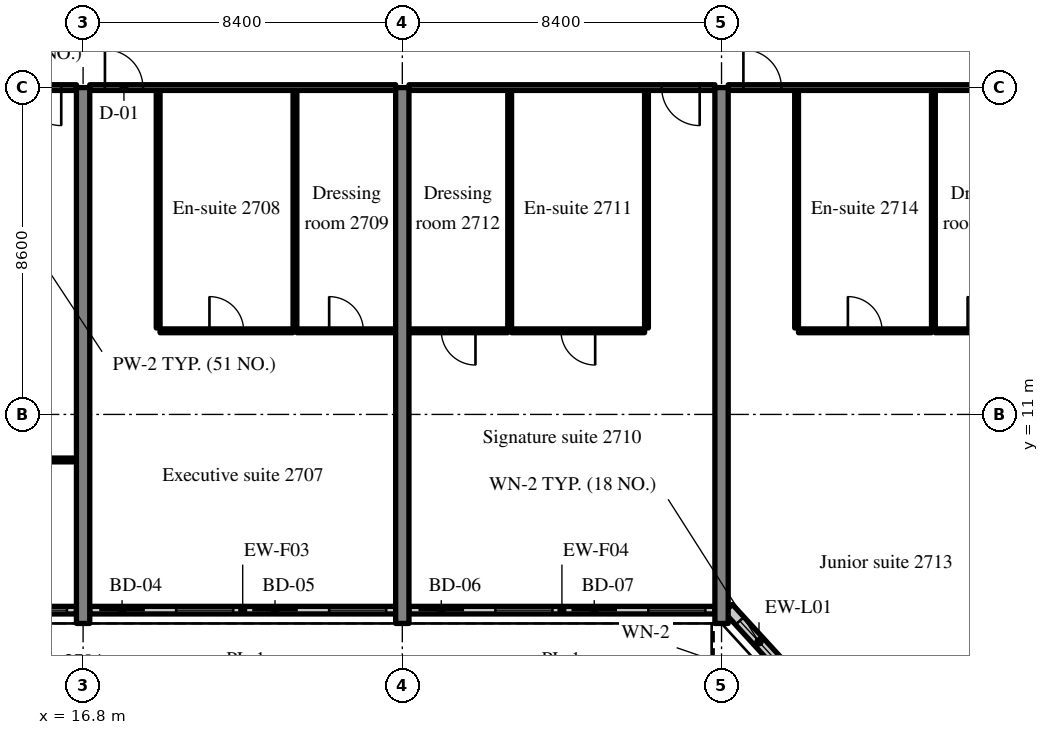
"""IFC4 building model, lengths in metres.
Left out: names, types, materials, properties, quantities, classifications, styles, units other than length and angle.
Written with IfcOpenShell. Run it as: python <this file> out.ifc"""

import sys

from ifc_helpers import new_model, si_unit, direction, frame, frame_2d, origin, place, context, subcontext, project, spatial, rectangle, extrude, source, transform, mapped, element, fill, save


model = new_model("IFC4")
c1 = context("Model", 3, precision=1e-05, world=origin(), true_north=direction((0.0, 1.0)))
c2 = subcontext(c1, "Body", "Model", "MODEL_VIEW")
j1 = project(units=[si_unit("LENGTHUNIT", "METRE"), si_unit("PLANEANGLEUNIT", "RADIAN")], contexts=[c1])
p1 = place(None, origin())
s1 = spatial("IfcSite", under=j1, at=p1, CompositionType="ELEMENT")
p2 = place(p1, origin())
s2 = spatial("IfcBuilding", under=s1, at=p2, CompositionType="ELEMENT")
p3 = place(p2, frame((0.0, 0.0, 114.2)))
s3 = spatial("IfcBuildingStorey", under=s2, at=p3, CompositionType="ELEMENT", Elevation=114.2)
m1 = source(origin(), c2, "Body", "SweptSolid", [
    extrude(rectangle(XDim=14.1, YDim=0.35, at=frame_2d((7.05, 0.0))), origin(), (0.0, 0.0, 1.0), 3.52),
])
for number, where, z_axis, x_axis in (
    (1, (16.8, 5.5, 0.0), (0.0, 0.0, 1.0), (0.0, 1.0, 0.0)),
    (2, (25.2, 5.5, 0.0), (0.0, 0.0, 1.0), (0.0, 1.0, 0.0)),
    (3, (33.6, 5.5, 0.0), (0.0, 0.0, 1.0), (0.0, 1.0, 0.0)),
):
    element("IfcWall", number, at=place(p3, frame(where, z_axis=z_axis, x_axis=x_axis)), inside=s3, PredefinedType="SHEAR", context=c2, shape_type="MappedRepresentation", body=[
        mapped(m1, transform((0.0, 0.0, 0.0), scale=1.0)),
    ])
m2 = source(origin(), c2, "Body", "SweptSolid", [
    extrude(rectangle(XDim=8.05, YDim=0.2, at=frame_2d((4.025, 0.0))), origin(), (0.0, 0.0, 1.0), 2.82),
])
p4 = place(p3, frame((8.575, 5.85, 0.0), z_axis=(0.0, 0.0, 1.0), x_axis=(1.0, 0.0, 0.0)))
e4 = element("IfcWall", 4, at=p4, inside=s3, PredefinedType="SOLIDWALL", context=c2, shape_type="MappedRepresentation", body=[
    mapped(m2, transform((0.0, 0.0, 0.0), scale=1.0)),
])
m3 = source(origin(), c2, "Body", "SweptSolid", [
    extrude(rectangle(XDim=1.2, YDim=2.4, at=frame_2d((0.6, 1.2))), frame((0.0, 0.11, 0.0), z_axis=(0.0, -1.0, 0.0), x_axis=(1.0, 0.0, 0.0)), (0.0, 0.0, 1.0), 0.22),
])
p5 = place(p4, frame((0.25, 0.0, 0.0)))
e5 = element("IfcOpeningElement", 5, at=p5, cuts=e4, PredefinedType="OPENING", context=c2, shape_type="MappedRepresentation", body=[
    mapped(m3, transform((0.0, 0.0, 0.0), scale=1.0)),
])
m4 = source(origin(), c2, "Body", "SweptSolid", [
    extrude(rectangle(XDim=1.5, YDim=1.5, at=frame_2d((0.75, 0.75))), frame((0.0, 0.11, 0.0), z_axis=(0.0, -1.0, 0.0), x_axis=(1.0, 0.0, 0.0)), (0.0, 0.0, 1.0), 0.22),
])
p6 = place(p4, frame((2.275, 0.0, 0.9)))
e6 = element("IfcOpeningElement", 6, at=p6, cuts=e4, PredefinedType="OPENING", context=c2, shape_type="MappedRepresentation", body=[
    mapped(m4, transform((0.0, 0.0, 0.0), scale=1.0)),
])
p7 = place(p4, frame((4.275, 0.0, 0.0)))
e7 = element("IfcOpeningElement", 7, at=p7, cuts=e4, PredefinedType="OPENING", context=c2, shape_type="MappedRepresentation", body=[
    mapped(m3, transform((0.0, 0.0, 0.0), scale=1.0)),
])
p8 = place(p4, frame((6.3, 0.0, 0.9)))
e8 = element("IfcOpeningElement", 8, at=p8, cuts=e4, PredefinedType="OPENING", context=c2, shape_type="MappedRepresentation", body=[
    mapped(m4, transform((0.0, 0.0, 0.0), scale=1.0)),
])
m5 = source(origin(), c2, "Body", "SweptSolid", [
    extrude(rectangle(XDim=8.05, YDim=0.2, at=frame_2d((4.025, 0.0))), origin(), (0.0, 0.0, 1.0), 2.82),
])
p9 = place(p3, frame((16.975, 5.85, 0.0), z_axis=(0.0, 0.0, 1.0), x_axis=(1.0, 0.0, 0.0)))
e9 = element("IfcWall", 9, at=p9, inside=s3, PredefinedType="SOLIDWALL", context=c2, shape_type="MappedRepresentation", body=[
    mapped(m5, transform((0.0, 0.0, 0.0), scale=1.0)),
])
p10 = place(p9, frame((0.25, 0.0, 0.0)))
e10 = element("IfcOpeningElement", 10, at=p10, cuts=e9, PredefinedType="OPENING", context=c2, shape_type="MappedRepresentation", body=[
    mapped(m3, transform((0.0, 0.0, 0.0), scale=1.0)),
])
p11 = place(p9, frame((2.275, 0.0, 0.9)))
e11 = element("IfcOpeningElement", 11, at=p11, cuts=e9, PredefinedType="OPENING", context=c2, shape_type="MappedRepresentation", body=[
    mapped(m4, transform((0.0, 0.0, 0.0), scale=1.0)),
])
p12 = place(p9, frame((4.275, 0.0, 0.0)))
e12 = element("IfcOpeningElement", 12, at=p12, cuts=e9, PredefinedType="OPENING", context=c2, shape_type="MappedRepresentation", body=[
    mapped(m3, transform((0.0, 0.0, 0.0), scale=1.0)),
])
p13 = place(p9, frame((6.3, 0.0, 0.9)))
e13 = element("IfcOpeningElement", 13, at=p13, cuts=e9, PredefinedType="OPENING", context=c2, shape_type="MappedRepresentation", body=[
    mapped(m4, transform((0.0, 0.0, 0.0), scale=1.0)),
])
p14 = place(p3, frame((25.375, 5.85, 0.0), z_axis=(0.0, 0.0, 1.0), x_axis=(1.0, 0.0, 0.0)))
e14 = element("IfcWall", 14, at=p14, inside=s3, PredefinedType="SOLIDWALL", context=c2, shape_type="MappedRepresentation", body=[
    mapped(m2, transform((0.0, 0.0, 0.0), scale=1.0)),
])
p15 = place(p14, frame((0.25, 0.0, 0.0)))
e15 = element("IfcOpeningElement", 15, at=p15, cuts=e14, PredefinedType="OPENING", context=c2, shape_type="MappedRepresentation", body=[
    mapped(m3, transform((0.0, 0.0, 0.0), scale=1.0)),
])
p16 = place(p14, frame((2.275, 0.0, 0.9)))
e16 = element("IfcOpeningElement", 16, at=p16, cuts=e14, PredefinedType="OPENING", context=c2, shape_type="MappedRepresentation", body=[
    mapped(m4, transform((0.0, 0.0, 0.0), scale=1.0)),
])
p17 = place(p14, frame((4.275, 0.0, 0.0)))
e17 = element("IfcOpeningElement", 17, at=p17, cuts=e14, PredefinedType="OPENING", context=c2, shape_type="MappedRepresentation", body=[
    mapped(m3, transform((0.0, 0.0, 0.0), scale=1.0)),
])
p18 = place(p14, frame((6.3, 0.0, 0.9)))
e18 = element("IfcOpeningElement", 18, at=p18, cuts=e14, PredefinedType="OPENING", context=c2, shape_type="MappedRepresentation", body=[
    mapped(m4, transform((0.0, 0.0, 0.0), scale=1.0)),
])
m6 = source(origin(), c2, "Body", "SweptSolid", [
    extrude(rectangle(XDim=2.398, YDim=0.3, at=frame_2d((1.199, 0.0))), origin(), (0.0, 0.0, 1.0), 3.52),
])
p19 = place(p3, frame((33.776, 5.9, 0.0), z_axis=(0.0, 0.0, 1.0), x_axis=(0.675374189419, -0.737475222815, 0.0)))
e19 = element("IfcWall", 19, at=p19, inside=s3, PredefinedType="SOLIDWALL", context=c2, shape_type="MappedRepresentation", body=[
    mapped(m6, transform((0.0, 0.0, 0.0), scale=1.0)),
])
m7 = source(origin(), c2, "Body", "SweptSolid", [
    extrude(rectangle(XDim=1.5, YDim=2.0, at=frame_2d((0.75, 1.0))), frame((0.0, 0.16, 0.0), z_axis=(0.0, -1.0, 0.0), x_axis=(1.0, 0.0, 0.0)), (0.0, 0.0, 1.0), 0.32),
])
p20 = place(p19, frame((0.449, 0.0, 0.9)))
e20 = element("IfcOpeningElement", 20, at=p20, cuts=e19, PredefinedType="OPENING", context=c2, shape_type="MappedRepresentation", body=[
    mapped(m7, transform((0.0, 0.0, 0.0), scale=1.0)),
])
m8 = source(origin(), c2, "Body", "SweptSolid", [
    extrude(rectangle(XDim=8.05, YDim=0.1, at=frame_2d((4.025, 0.0))), origin(), (0.0, 0.0, 1.0), 3.52),
])
p21 = place(p3, frame((8.575, 9.802, 0.0), z_axis=(0.0, 0.0, 1.0), x_axis=(1.0, 0.0, 0.0)))
e21 = element("IfcWall", 21, at=p21, inside=s3, PredefinedType="PARTITIONING", context=c2, shape_type="MappedRepresentation", body=[
    mapped(m8, transform((0.0, 0.0, 0.0), scale=1.0)),
])
m9 = source(origin(), c2, "Body", "SweptSolid", [
    extrude(rectangle(XDim=1.8, YDim=2.1, at=frame_2d((0.9, 1.05))), frame((0.0, 0.06, 0.0), z_axis=(0.0, -1.0, 0.0), x_axis=(1.0, 0.0, 0.0)), (0.0, 0.0, 1.0), 0.12),
])
p22 = place(p21, frame((3.125, 0.0, 0.0)))
e22 = element("IfcOpeningElement", 22, at=p22, cuts=e21, PredefinedType="OPENING", context=c2, shape_type="MappedRepresentation", body=[
    mapped(m9, transform((0.0, 0.0, 0.0), scale=1.0)),
])
m10 = source(origin(), c2, "Body", "SweptSolid", [
    extrude(rectangle(XDim=8.05, YDim=0.15, at=frame_2d((4.025, 0.0))), origin(), (0.0, 0.0, 1.0), 2.82),
])
p23 = place(p3, frame((8.575, 19.6, 0.0), z_axis=(0.0, 0.0, 1.0), x_axis=(1.0, 0.0, 0.0)))
e23 = element("IfcWall", 23, at=p23, inside=s3, PredefinedType="PARTITIONING", context=c2, shape_type="MappedRepresentation", body=[
    mapped(m10, transform((0.0, 0.0, 0.0), scale=1.0)),
])
m11 = source(origin(), c2, "Body", "SweptSolid", [
    extrude(rectangle(XDim=1.0, YDim=2.1, at=frame_2d((0.5, 1.05))), frame((0.0, 0.085, 0.0), z_axis=(0.0, -1.0, 0.0), x_axis=(1.0, 0.0, 0.0)), (0.0, 0.0, 1.0), 0.17),
])
p24 = place(p23, frame((6.65, 0.0, 0.0)))
e24 = element("IfcOpeningElement", 24, at=p24, cuts=e23, PredefinedType="OPENING", context=c2, shape_type="MappedRepresentation", body=[
    mapped(m11, transform((0.0, 0.0, 0.0), scale=1.0)),
])
m12 = source(origin(), c2, "Body", "SweptSolid", [
    extrude(rectangle(XDim=6.25, YDim=0.1, at=frame_2d((3.125, 0.0))), origin(), (0.0, 0.0, 1.0), 3.52),
])
for number, where, z_axis, x_axis in (
    (25, (18.775, 13.275, 0.0), (0.0, 0.0, 1.0), (0.0, 1.0, 0.0)),
    (26, (22.375, 13.275, 0.0), (0.0, 0.0, 1.0), (0.0, 1.0, 0.0)),
):
    element("IfcWall", number, at=place(p3, frame(where, z_axis=z_axis, x_axis=x_axis)), inside=s3, PredefinedType="PARTITIONING", context=c2, shape_type="MappedRepresentation", body=[
        mapped(m12, transform((0.0, 0.0, 0.0), scale=1.0)),
    ])
m13 = source(origin(), c2, "Body", "SweptSolid", [
    extrude(rectangle(XDim=3.5, YDim=0.1, at=frame_2d((1.75, 0.0))), origin(), (0.0, 0.0, 1.0), 3.52),
])
p25 = place(p3, frame((18.825, 13.2, 0.0), z_axis=(0.0, 0.0, 1.0), x_axis=(1.0, 0.0, 0.0)))
e27 = element("IfcWall", 27, at=p25, inside=s3, PredefinedType="PARTITIONING", context=c2, shape_type="MappedRepresentation", body=[
    mapped(m13, transform((0.0, 0.0, 0.0), scale=1.0)),
])
m14 = source(origin(), c2, "Body", "SweptSolid", [
    extrude(rectangle(XDim=0.9, YDim=2.1, at=frame_2d((0.45, 1.05))), frame((0.0, 0.06, 0.0), z_axis=(0.0, -1.0, 0.0), x_axis=(1.0, 0.0, 0.0)), (0.0, 0.0, 1.0), 0.12),
])
p26 = place(p25, frame((1.3, 0.0, 0.0)))
e28 = element("IfcOpeningElement", 28, at=p26, cuts=e27, PredefinedType="OPENING", context=c2, shape_type="MappedRepresentation", body=[
    mapped(m14, transform((0.0, 0.0, 0.0), scale=1.0)),
])
m15 = source(origin(), c2, "Body", "SweptSolid", [
    extrude(rectangle(XDim=2.6, YDim=0.1, at=frame_2d((1.3, 0.0))), origin(), (0.0, 0.0, 1.0), 3.52),
])
p27 = place(p3, frame((22.425, 13.2, 0.0), z_axis=(0.0, 0.0, 1.0), x_axis=(1.0, 0.0, 0.0)))
e29 = element("IfcWall", 29, at=p27, inside=s3, PredefinedType="PARTITIONING", context=c2, shape_type="MappedRepresentation", body=[
    mapped(m15, transform((0.0, 0.0, 0.0), scale=1.0)),
])
p28 = place(p27, frame((0.85, 0.0, 0.0)))
e30 = element("IfcOpeningElement", 30, at=p28, cuts=e29, PredefinedType="OPENING", context=c2, shape_type="MappedRepresentation", body=[
    mapped(m14, transform((0.0, 0.0, 0.0), scale=1.0)),
])
m16 = source(origin(), c2, "Body", "SweptSolid", [
    extrude(rectangle(XDim=8.05, YDim=0.15, at=frame_2d((4.025, 0.0))), origin(), (0.0, 0.0, 1.0), 2.82),
])
p29 = place(p3, frame((16.975, 19.6, 0.0), z_axis=(0.0, 0.0, 1.0), x_axis=(1.0, 0.0, 0.0)))
e31 = element("IfcWall", 31, at=p29, inside=s3, PredefinedType="PARTITIONING", context=c2, shape_type="MappedRepresentation", body=[
    mapped(m16, transform((0.0, 0.0, 0.0), scale=1.0)),
])
p30 = place(p29, frame((0.4, 0.0, 0.0)))
e32 = element("IfcOpeningElement", 32, at=p30, cuts=e31, PredefinedType="OPENING", context=c2, shape_type="MappedRepresentation", body=[
    mapped(m11, transform((0.0, 0.0, 0.0), scale=1.0)),
])
for number, where, z_axis, x_axis in (
    (33, (31.625, 13.275, 0.0), (0.0, 0.0, 1.0), (0.0, 1.0, 0.0)),
    (34, (28.025, 13.275, 0.0), (0.0, 0.0, 1.0), (0.0, 1.0, 0.0)),
):
    element("IfcWall", number, at=place(p3, frame(where, z_axis=z_axis, x_axis=x_axis)), inside=s3, PredefinedType="PARTITIONING", context=c2, shape_type="MappedRepresentation", body=[
        mapped(m12, transform((0.0, 0.0, 0.0), scale=1.0)),
    ])
p31 = place(p3, frame((28.075, 13.2, 0.0), z_axis=(0.0, 0.0, 1.0), x_axis=(1.0, 0.0, 0.0)))
e35 = element("IfcWall", 35, at=p31, inside=s3, PredefinedType="PARTITIONING", context=c2, shape_type="MappedRepresentation", body=[
    mapped(m13, transform((0.0, 0.0, 0.0), scale=1.0)),
])
p32 = place(p31, frame((1.3, 0.0, 0.0)))
e36 = element("IfcOpeningElement", 36, at=p32, cuts=e35, PredefinedType="OPENING", context=c2, shape_type="MappedRepresentation", body=[
    mapped(m14, transform((0.0, 0.0, 0.0), scale=1.0)),
])
m17 = source(origin(), c2, "Body", "SweptSolid", [
    extrude(rectangle(XDim=2.6, YDim=0.1, at=frame_2d((1.3, 0.0))), origin(), (0.0, 0.0, 1.0), 3.52),
])
p33 = place(p3, frame((25.375, 13.2, 0.0), z_axis=(0.0, 0.0, 1.0), x_axis=(1.0, 0.0, 0.0)))
e37 = element("IfcWall", 37, at=p33, inside=s3, PredefinedType="PARTITIONING", context=c2, shape_type="MappedRepresentation", body=[
    mapped(m17, transform((0.0, 0.0, 0.0), scale=1.0)),
])
p34 = place(p33, frame((0.85, 0.0, 0.0)))
e38 = element("IfcOpeningElement", 38, at=p34, cuts=e37, PredefinedType="OPENING", context=c2, shape_type="MappedRepresentation", body=[
    mapped(m14, transform((0.0, 0.0, 0.0), scale=1.0)),
])
p35 = place(p3, frame((25.375, 19.6, 0.0), z_axis=(0.0, 0.0, 1.0), x_axis=(1.0, 0.0, 0.0)))
e39 = element("IfcWall", 39, at=p35, inside=s3, PredefinedType="PARTITIONING", context=c2, shape_type="MappedRepresentation", body=[
    mapped(m10, transform((0.0, 0.0, 0.0), scale=1.0)),
])
p36 = place(p35, frame((6.65, 0.0, 0.0)))
e40 = element("IfcOpeningElement", 40, at=p36, cuts=e39, PredefinedType="OPENING", context=c2, shape_type="MappedRepresentation", body=[
    mapped(m11, transform((0.0, 0.0, 0.0), scale=1.0)),
])
for number, where, z_axis, x_axis in (
    (41, (35.575, 13.275, 0.0), (0.0, 0.0, 1.0), (0.0, 1.0, 0.0)),
    (42, (39.175, 13.275, 0.0), (0.0, 0.0, 1.0), (0.0, 1.0, 0.0)),
):
    element("IfcWall", number, at=place(p3, frame(where, z_axis=z_axis, x_axis=x_axis)), inside=s3, PredefinedType="PARTITIONING", context=c2, shape_type="MappedRepresentation", body=[
        mapped(m12, transform((0.0, 0.0, 0.0), scale=1.0)),
    ])
p37 = place(p3, frame((35.625, 13.2, 0.0), z_axis=(0.0, 0.0, 1.0), x_axis=(1.0, 0.0, 0.0)))
e43 = element("IfcWall", 43, at=p37, inside=s3, PredefinedType="PARTITIONING", context=c2, shape_type="MappedRepresentation", body=[
    mapped(m13, transform((0.0, 0.0, 0.0), scale=1.0)),
])
p38 = place(p37, frame((1.3, 0.0, 0.0)))
e44 = element("IfcOpeningElement", 44, at=p38, cuts=e43, PredefinedType="OPENING", context=c2, shape_type="MappedRepresentation", body=[
    mapped(m14, transform((0.0, 0.0, 0.0), scale=1.0)),
])
p39 = place(p3, frame((39.225, 13.2, 0.0), z_axis=(0.0, 0.0, 1.0), x_axis=(1.0, 0.0, 0.0)))
e45 = element("IfcWall", 45, at=p39, inside=s3, PredefinedType="PARTITIONING", context=c2, shape_type="MappedRepresentation", body=[
    mapped(m15, transform((0.0, 0.0, 0.0), scale=1.0)),
])
p40 = place(p39, frame((0.85, 0.0, 0.0)))
e46 = element("IfcOpeningElement", 46, at=p40, cuts=e45, PredefinedType="OPENING", context=c2, shape_type="MappedRepresentation", body=[
    mapped(m14, transform((0.0, 0.0, 0.0), scale=1.0)),
])
p41 = place(p3, frame((33.775, 19.6, 0.0), z_axis=(0.0, 0.0, 1.0), x_axis=(1.0, 0.0, 0.0)))
e47 = element("IfcWall", 47, at=p41, inside=s3, PredefinedType="PARTITIONING", context=c2, shape_type="MappedRepresentation", body=[
    mapped(m10, transform((0.0, 0.0, 0.0), scale=1.0)),
])
p42 = place(p41, frame((0.4, 0.0, 0.0)))
e48 = element("IfcOpeningElement", 48, at=p42, cuts=e47, PredefinedType="OPENING", context=c2, shape_type="MappedRepresentation", body=[
    mapped(m11, transform((0.0, 0.0, 0.0), scale=1.0)),
])
m18 = source(origin(), c2, "Body", "SweptSolid", [
    extrude(rectangle(XDim=1.5, YDim=1.5, at=frame_2d((0.75, 0.75))), frame((0.0, 0.03, 0.0), z_axis=(0.0, -1.0, 0.0), x_axis=(1.0, 0.0, 0.0)), (0.0, 0.0, 1.0), 0.06),
])
p43 = place(p8, origin())
e49 = element("IfcWindow", 49, at=p43, inside=s3, PartitioningType="SINGLE_PANEL", PredefinedType="WINDOW", context=c2, shape_type="MappedRepresentation", body=[
    mapped(m18, transform((0.0, 0.0, 0.0), scale=1.0)),
])
fill(e8, e49)
m19 = source(origin(), c2, "Body", "SweptSolid", [
    extrude(rectangle(XDim=1.2, YDim=2.4, at=frame_2d((0.6, 1.2))), frame((0.0, 0.025, 0.0), z_axis=(0.0, -1.0, 0.0), x_axis=(1.0, 0.0, 0.0)), (0.0, 0.0, 1.0), 0.05),
])
p44 = place(p10, origin())
e50 = element("IfcDoor", 50, at=p44, inside=s3, OperationType="SLIDING_TO_RIGHT", PredefinedType="DOOR", context=c2, shape_type="MappedRepresentation", body=[
    mapped(m19, transform((0.0, 0.0, 0.0), scale=1.0)),
])
fill(e10, e50)
p45 = place(p11, origin())
e51 = element("IfcWindow", 51, at=p45, inside=s3, PartitioningType="SINGLE_PANEL", PredefinedType="WINDOW", context=c2, shape_type="MappedRepresentation", body=[
    mapped(m18, transform((0.0, 0.0, 0.0), scale=1.0)),
])
fill(e11, e51)
p46 = place(p12, origin())
e52 = element("IfcDoor", 52, at=p46, inside=s3, OperationType="SLIDING_TO_LEFT", PredefinedType="DOOR", context=c2, shape_type="MappedRepresentation", body=[
    mapped(m19, transform((0.0, 0.0, 0.0), scale=1.0)),
])
fill(e12, e52)
p47 = place(p13, origin())
e53 = element("IfcWindow", 53, at=p47, inside=s3, PartitioningType="SINGLE_PANEL", PredefinedType="WINDOW", context=c2, shape_type="MappedRepresentation", body=[
    mapped(m18, transform((0.0, 0.0, 0.0), scale=1.0)),
])
fill(e13, e53)
p48 = place(p15, origin())
e54 = element("IfcDoor", 54, at=p48, inside=s3, OperationType="SLIDING_TO_RIGHT", PredefinedType="DOOR", context=c2, shape_type="MappedRepresentation", body=[
    mapped(m19, transform((0.0, 0.0, 0.0), scale=1.0)),
])
fill(e15, e54)
p49 = place(p16, origin())
e55 = element("IfcWindow", 55, at=p49, inside=s3, PartitioningType="SINGLE_PANEL", PredefinedType="WINDOW", context=c2, shape_type="MappedRepresentation", body=[
    mapped(m18, transform((0.0, 0.0, 0.0), scale=1.0)),
])
fill(e16, e55)
p50 = place(p17, origin())
e56 = element("IfcDoor", 56, at=p50, inside=s3, OperationType="SLIDING_TO_LEFT", PredefinedType="DOOR", context=c2, shape_type="MappedRepresentation", body=[
    mapped(m19, transform((0.0, 0.0, 0.0), scale=1.0)),
])
fill(e17, e56)
p51 = place(p18, origin())
e57 = element("IfcWindow", 57, at=p51, inside=s3, PartitioningType="SINGLE_PANEL", PredefinedType="WINDOW", context=c2, shape_type="MappedRepresentation", body=[
    mapped(m18, transform((0.0, 0.0, 0.0), scale=1.0)),
])
fill(e18, e57)
m20 = source(origin(), c2, "Body", "SweptSolid", [
    extrude(rectangle(XDim=1.5, YDim=2.0, at=frame_2d((0.75, 1.0))), frame((0.0, 0.03, 0.0), z_axis=(0.0, -1.0, 0.0), x_axis=(1.0, 0.0, 0.0)), (0.0, 0.0, 1.0), 0.06),
])
p52 = place(p20, origin())
e58 = element("IfcWindow", 58, at=p52, inside=s3, PartitioningType="SINGLE_PANEL", PredefinedType="WINDOW", context=c2, shape_type="MappedRepresentation", body=[
    mapped(m20, transform((0.0, 0.0, 0.0), scale=1.0)),
])
fill(e20, e58)
m21 = source(origin(), c2, "Body", "SweptSolid", [
    extrude(rectangle(XDim=1.0, YDim=2.1, at=frame_2d((0.5, 1.05))), frame((0.0, 0.025, 0.0), z_axis=(0.0, -1.0, 0.0), x_axis=(1.0, 0.0, 0.0)), (0.0, 0.0, 1.0), 0.05),
])
p53 = place(p24, origin())
e59 = element("IfcDoor", 59, at=p53, inside=s3, OperationType="SINGLE_SWING_RIGHT", PredefinedType="DOOR", context=c2, shape_type="MappedRepresentation", body=[
    mapped(m21, transform((0.0, 0.0, 0.0), scale=1.0)),
])
fill(e24, e59)
m22 = source(origin(), c2, "Body", "SweptSolid", [
    extrude(rectangle(XDim=0.9, YDim=2.1, at=frame_2d((0.45, 1.05))), frame((0.0, 0.025, 0.0), z_axis=(0.0, -1.0, 0.0), x_axis=(1.0, 0.0, 0.0)), (0.0, 0.0, 1.0), 0.05),
])
p54 = place(p26, origin())
e60 = element("IfcDoor", 60, at=p54, inside=s3, OperationType="SINGLE_SWING_LEFT", PredefinedType="DOOR", context=c2, shape_type="MappedRepresentation", body=[
    mapped(m22, transform((0.0, 0.0, 0.0), scale=1.0)),
])
fill(e28, e60)
p55 = place(p28, origin())
e61 = element("IfcDoor", 61, at=p55, inside=s3, OperationType="SINGLE_SWING_LEFT", PredefinedType="DOOR", context=c2, shape_type="MappedRepresentation", body=[
    mapped(m22, transform((0.0, 0.0, 0.0), scale=1.0)),
])
fill(e30, e61)
p56 = place(p30, origin())
e62 = element("IfcDoor", 62, at=p56, inside=s3, OperationType="SINGLE_SWING_LEFT", PredefinedType="DOOR", context=c2, shape_type="MappedRepresentation", body=[
    mapped(m21, transform((0.0, 0.0, 0.0), scale=1.0)),
])
fill(e32, e62)
p57 = place(p32, origin())
e63 = element("IfcDoor", 63, at=p57, inside=s3, OperationType="SINGLE_SWING_RIGHT", PredefinedType="DOOR", context=c2, shape_type="MappedRepresentation", body=[
    mapped(m22, transform((0.0, 0.0, 0.0), scale=1.0)),
])
fill(e36, e63)
p58 = place(p34, origin())
e64 = element("IfcDoor", 64, at=p58, inside=s3, OperationType="SINGLE_SWING_RIGHT", PredefinedType="DOOR", context=c2, shape_type="MappedRepresentation", body=[
    mapped(m22, transform((0.0, 0.0, 0.0), scale=1.0)),
])
fill(e38, e64)
p59 = place(p36, origin())
e65 = element("IfcDoor", 65, at=p59, inside=s3, OperationType="SINGLE_SWING_RIGHT", PredefinedType="DOOR", context=c2, shape_type="MappedRepresentation", body=[
    mapped(m21, transform((0.0, 0.0, 0.0), scale=1.0)),
])
fill(e40, e65)
p60 = place(p38, origin())
e66 = element("IfcDoor", 66, at=p60, inside=s3, OperationType="SINGLE_SWING_LEFT", PredefinedType="DOOR", context=c2, shape_type="MappedRepresentation", body=[
    mapped(m22, transform((0.0, 0.0, 0.0), scale=1.0)),
])
fill(e44, e66)
p61 = place(p40, origin())
e67 = element("IfcDoor", 67, at=p61, inside=s3, OperationType="SINGLE_SWING_LEFT", PredefinedType="DOOR", context=c2, shape_type="MappedRepresentation", body=[
    mapped(m22, transform((0.0, 0.0, 0.0), scale=1.0)),
])
fill(e46, e67)
p62 = place(p42, origin())
e68 = element("IfcDoor", 68, at=p62, inside=s3, OperationType="SINGLE_SWING_LEFT", PredefinedType="DOOR", context=c2, shape_type="MappedRepresentation", body=[
    mapped(m21, transform((0.0, 0.0, 0.0), scale=1.0)),
])
fill(e48, e68)
save(model, sys.argv[1])
